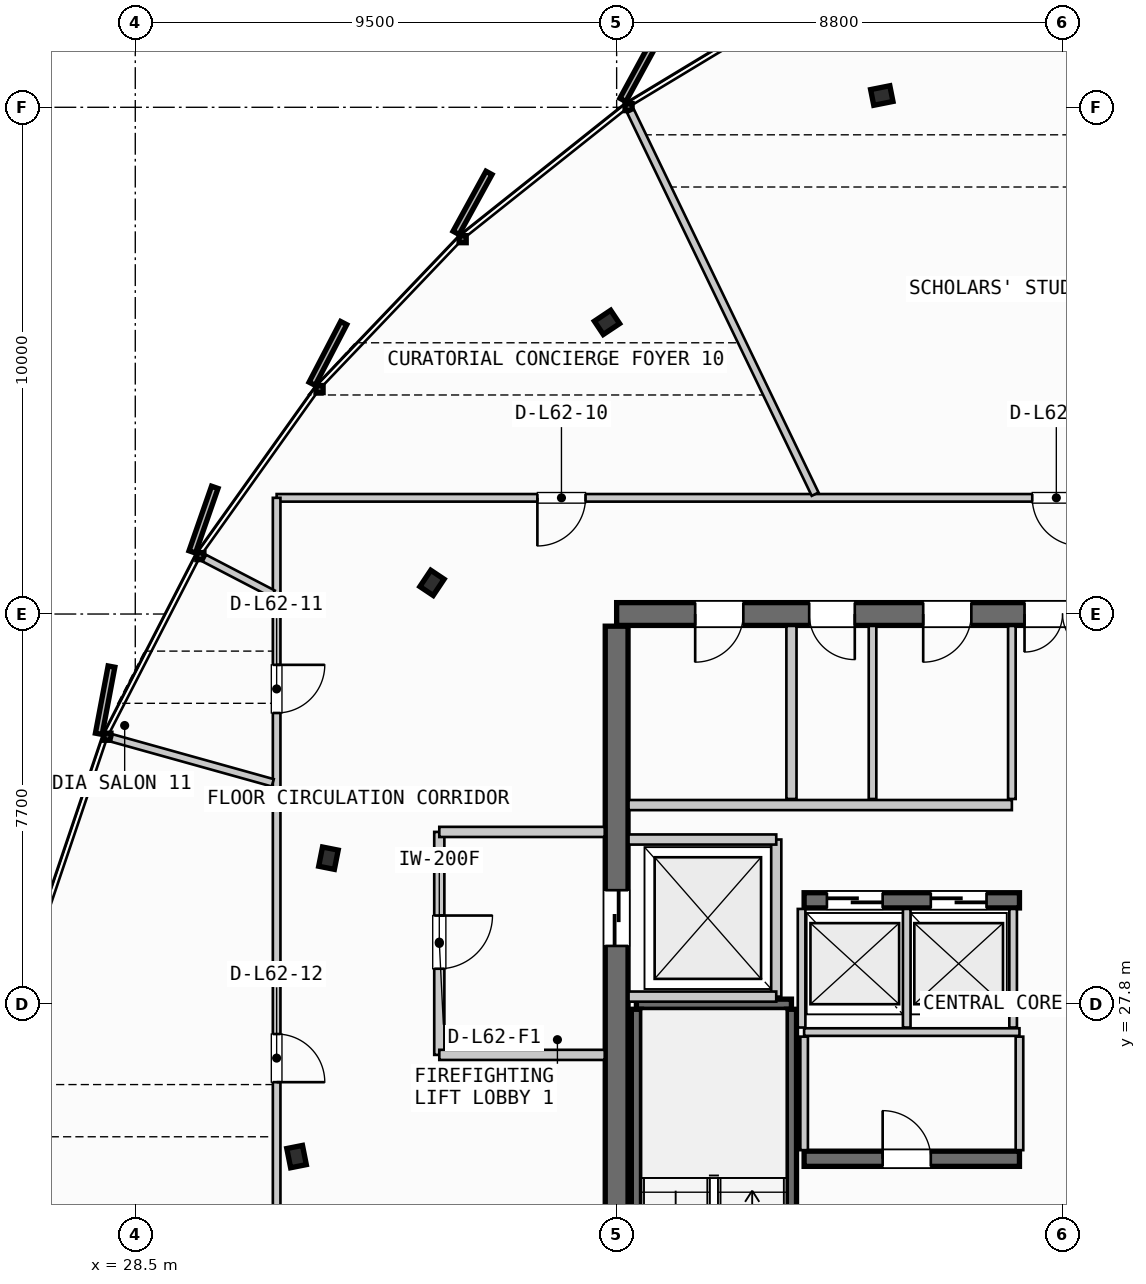
"""IFC4 building model, lengths in metres.
Left out: names, types, materials, properties, quantities, classifications, styles, units other than length and angle.
Written with IfcOpenShell. Run it as: python <this file> out.ifc"""

import sys

from ifc_helpers import new_model, si_unit, direction, frame, frame_2d, origin, origin_2d, place, context, subcontext, project, spatial, rectangle, i_section, extrude, source, transform, mapped, element, fill, save


model = new_model("IFC4")
c1 = context("Model", 3, precision=1e-05, world=origin(), true_north=direction((0.0, 1.0)))
c2 = subcontext(c1, "Body", "Model", "MODEL_VIEW")
j1 = project(units=[si_unit("LENGTHUNIT", "METRE"), si_unit("PLANEANGLEUNIT", "RADIAN")], contexts=[c1])
p1 = place(None, origin())
s1 = spatial("IfcSite", under=j1, at=p1, CompositionType="ELEMENT")
p2 = place(p1, origin())
s2 = spatial("IfcBuilding", under=s1, at=p2, CompositionType="ELEMENT")
p3 = place(p2, frame((0.0, 0.0, 238.75)))
s3 = spatial("IfcBuildingStorey", under=s2, at=p3, CompositionType="ELEMENT", Elevation=238.75)
p4 = place(p3, frame((55.6, 35.5, 0.0), z_axis=(0.0, 0.0, 1.0), x_axis=(-1.0, 0.0, 0.0)))
e1 = element("IfcWall", 1, at=p4, inside=s3, PredefinedType="SHEAR", context=c2, shape_type="SweptSolid", body=[
    extrude(rectangle(XDim=17.6, YDim=0.45, at=frame_2d((8.8, 0.0))), origin(), (0.0, 0.0, 1.0), 3.21),
])
p5 = place(p4, frame((8.05, 0.0, 0.0)))
e2 = element("IfcOpeningElement", 2, at=p5, cuts=e1, PredefinedType="OPENING", context=c2, shape_type="SweptSolid", body=[
    extrude(rectangle(XDim=1.5, YDim=2.2, at=frame_2d((0.75, 1.1))), frame((0.0, 0.235, 0.0), z_axis=(0.0, -1.0, 0.0), x_axis=(1.0, 0.0, 0.0)), (0.0, 0.0, 1.0), 0.47),
])
p6 = place(p4, frame((15.1, 0.0, 0.0)))
e3 = element("IfcOpeningElement", 3, at=p6, cuts=e1, PredefinedType="OPENING", context=c2, shape_type="SweptSolid", body=[
    extrude(rectangle(XDim=0.95, YDim=2.15, at=frame_2d((0.475, 1.075))), frame((0.0, 0.235, 0.0), z_axis=(0.0, -1.0, 0.0), x_axis=(1.0, 0.0, 0.0)), (0.0, 0.0, 1.0), 0.47),
])
p7 = place(p4, frame((12.9, 0.0, 0.0)))
e4 = element("IfcOpeningElement", 4, at=p7, cuts=e1, PredefinedType="OPENING", context=c2, shape_type="SweptSolid", body=[
    extrude(rectangle(XDim=0.9, YDim=2.15, at=frame_2d((0.45, 1.075))), frame((0.0, 0.235, 0.0), z_axis=(0.0, -1.0, 0.0), x_axis=(1.0, 0.0, 0.0)), (0.0, 0.0, 1.0), 0.47),
])
p8 = place(p4, frame((10.6, 0.0, 0.0)))
e5 = element("IfcOpeningElement", 5, at=p8, cuts=e1, PredefinedType="OPENING", context=c2, shape_type="SweptSolid", body=[
    extrude(rectangle(XDim=0.95, YDim=2.15, at=frame_2d((0.475, 1.075))), frame((0.0, 0.235, 0.0), z_axis=(0.0, -1.0, 0.0), x_axis=(1.0, 0.0, 0.0)), (0.0, 0.0, 1.0), 0.47),
])
p9 = place(p3, frame((38.0, 35.26, 0.0), z_axis=(0.0, 0.0, 1.0), x_axis=(0.0, -1.0, 0.0)))
e6 = element("IfcWall", 6, at=p9, inside=s3, PredefinedType="SHEAR", context=c2, shape_type="SweptSolid", body=[
    extrude(rectangle(XDim=14.92, YDim=0.45, at=frame_2d((7.46, 0.0))), origin(), (0.0, 0.0, 1.0), 3.21),
])
p10 = place(p9, frame((5.21, 0.0, 0.0)))
e7 = element("IfcOpeningElement", 7, at=p10, cuts=e6, PredefinedType="OPENING", context=c2, shape_type="SweptSolid", body=[
    extrude(rectangle(XDim=1.1, YDim=2.2, at=frame_2d((0.55, 1.1))), frame((0.0, 0.235, 0.0), z_axis=(0.0, -1.0, 0.0), x_axis=(1.0, 0.0, 0.0)), (0.0, 0.0, 1.0), 0.47),
])
p11 = place(p3, frame((41.7, 24.75, 0.0), z_axis=(0.0, 0.0, 1.0), x_axis=(1.0, 0.0, 0.0)))
e8 = element("IfcWall", 8, at=p11, inside=s3, PredefinedType="SHEAR", context=c2, shape_type="SweptSolid", body=[
    extrude(rectangle(XDim=4.25, YDim=0.3, at=frame_2d((2.125, 0.0))), origin(), (0.0, 0.0, 1.0), 3.21),
])
p12 = place(p11, frame((1.55, 0.0, 0.0)))
e9 = element("IfcOpeningElement", 9, at=p12, cuts=e8, PredefinedType="OPENING", context=c2, shape_type="SweptSolid", body=[
    extrude(rectangle(XDim=0.95, YDim=2.15, at=frame_2d((0.475, 1.075))), frame((0.0, 0.16, 0.0), z_axis=(0.0, -1.0, 0.0), x_axis=(1.0, 0.0, 0.0)), (0.0, 0.0, 1.0), 0.32),
])
p13 = place(p3, frame((41.7, 29.85, 0.0), z_axis=(0.0, 0.0, 1.0), x_axis=(1.0, 0.0, 0.0)))
e10 = element("IfcWall", 10, at=p13, inside=s3, PredefinedType="SHEAR", context=c2, shape_type="SweptSolid", body=[
    extrude(rectangle(XDim=4.25, YDim=0.3, at=frame_2d((2.125, 0.0))), origin(), (0.0, 0.0, 1.0), 3.21),
])
p14 = place(p13, frame((0.45, 0.0, 0.0)))
e11 = element("IfcOpeningElement", 11, at=p14, cuts=e10, PredefinedType="OPENING", context=c2, shape_type="SweptSolid", body=[
    extrude(rectangle(XDim=1.1, YDim=2.2, at=frame_2d((0.55, 1.1))), frame((0.0, 0.16, 0.0), z_axis=(0.0, -1.0, 0.0), x_axis=(1.0, 0.0, 0.0)), (0.0, 0.0, 1.0), 0.32),
])
p15 = place(p13, frame((2.5, 0.0, 0.0)))
e12 = element("IfcOpeningElement", 12, at=p15, cuts=e10, PredefinedType="OPENING", context=c2, shape_type="SweptSolid", body=[
    extrude(rectangle(XDim=1.1, YDim=2.2, at=frame_2d((0.55, 1.1))), frame((0.0, 0.16, 0.0), z_axis=(0.0, -1.0, 0.0), x_axis=(1.0, 0.0, 0.0)), (0.0, 0.0, 1.0), 0.32),
])
m1 = source(origin(), c2, "Body", "SweptSolid", [
    extrude(i_section(OverallWidth=0.387, OverallDepth=0.316, WebThickness=0.019, FlangeThickness=0.028, FilletRadius=0.015, at=origin_2d()), origin(), (0.0, 0.0, 1.0), 3.21),
])
for number, where, z_axis, x_axis in (
    (13, (43.233, 45.732, 0.0), (0.0, 0.0, 1.0), (-0.195, 0.981, 0.0)),
    (14, (37.81, 41.255, 0.0), (0.0, 0.0, 1.0), (-0.556, 0.831, 0.0)),
    (15, (34.356, 36.115, 0.0), (0.0, 0.0, 1.0), (-0.831, 0.556, 0.0)),
    (16, (32.312, 30.682, 0.0), (0.0, 0.0, 1.0), (-0.981, 0.195, 0.0)),
    (17, (31.683, 24.793, 0.0), (0.0, 0.0, 1.0), (-0.981, -0.195, 0.0)),
):
    element("IfcColumn", number, at=place(p3, frame(where, z_axis=z_axis, x_axis=x_axis)), inside=s3, PredefinedType="COLUMN", context=c2, shape_type="MappedRepresentation", body=[
        mapped(m1, transform((0.0, 0.0, 0.0), scale=1.0)),
    ])
p16 = place(p3, frame((38.39, 27.8, 0.0), z_axis=(0.0, 0.0, 1.0), x_axis=(1.0, 0.0, 0.0)))
e18 = element("IfcWall", 18, at=p16, inside=s3, PredefinedType="SHEAR", context=c2, shape_type="SweptSolid", body=[
    extrude(rectangle(XDim=3.06, YDim=0.2, at=frame_2d((1.53, 0.0))), origin(), (0.0, 0.0, 1.0), 3.21),
])
for number, where, z_axis, x_axis in (
    (19, (41.45, 27.7, 0.0), (0.0, 0.0, 1.0), (0.0, -1.0, 0.0)),
    (20, (38.39, 20.35, 0.0), (0.0, 0.0, 1.0), (0.0, 1.0, 0.0)),
):
    element("IfcWall", number, at=place(p3, frame(where, z_axis=z_axis, x_axis=x_axis)), inside=s3, PredefinedType="SHEAR", context=c2, shape_type="SweptSolid", body=[
        extrude(rectangle(XDim=7.35, YDim=0.2, at=frame_2d((3.675, 0.0))), origin(), (0.0, 0.0, 1.0), 3.21),
    ])
p17 = place(p3, frame((41.15, 27.95, 0.0), z_axis=(0.0, 0.0, 1.0), x_axis=(0.0, 1.0, 0.0)))
e21 = element("IfcWall", 21, at=p17, inside=s3, PredefinedType="PARTITIONING", context=c2, shape_type="SweptSolid", body=[
    extrude(rectangle(XDim=3.1, YDim=0.2, at=frame_2d((1.55, 0.0))), origin(), (0.0, 0.0, 1.0), 2.28),
])
for number, where, z_axis, x_axis in (
    (22, (38.235, 27.95, 0.0), (0.0, 0.0, 1.0), (1.0, 0.0, 0.0)),
    (23, (38.235, 31.05, 0.0), (0.0, 0.0, 1.0), (1.0, 0.0, 0.0)),
):
    element("IfcWall", number, at=place(p3, frame(where, z_axis=z_axis, x_axis=x_axis)), inside=s3, PredefinedType="PARTITIONING", context=c2, shape_type="SweptSolid", body=[
        extrude(rectangle(XDim=2.915, YDim=0.2, at=frame_2d((1.458, 0.0))), origin(), (0.0, 0.0, 1.0), 2.28),
    ])
p18 = place(p3, frame((34.5, 31.2, 0.0), z_axis=(0.0, 0.0, 1.0), x_axis=(0.0, -1.0, 0.0)))
e24 = element("IfcWall", 24, at=p18, inside=s3, PredefinedType="PARTITIONING", context=c2, shape_type="SweptSolid", body=[
    extrude(rectangle(XDim=4.4, YDim=0.2, at=frame_2d((2.2, 0.0))), origin(), (0.0, 0.0, 1.0), 2.28),
])
p19 = place(p18, frame((1.65, 0.0, 0.0)))
e25 = element("IfcOpeningElement", 25, at=p19, cuts=e24, PredefinedType="OPENING", context=c2, shape_type="SweptSolid", body=[
    extrude(rectangle(XDim=1.05, YDim=2.15, at=frame_2d((0.525, 1.075))), frame((0.0, 0.11, 0.0), z_axis=(0.0, -1.0, 0.0), x_axis=(1.0, 0.0, 0.0)), (0.0, 0.0, 1.0), 0.22),
])
for number, where, z_axis, x_axis in (
    (26, (34.5, 26.8, 0.0), (0.0, 0.0, 1.0), (1.0, 0.0, 0.0)),
    (27, (34.5, 31.2, 0.0), (0.0, 0.0, 1.0), (1.0, 0.0, 0.0)),
):
    element("IfcWall", number, at=place(p3, frame(where, z_axis=z_axis, x_axis=x_axis)), inside=s3, PredefinedType="PARTITIONING", context=c2, shape_type="SweptSolid", body=[
        extrude(rectangle(XDim=3.265, YDim=0.2, at=frame_2d((1.632, 0.0))), origin(), (0.0, 0.0, 1.0), 2.28),
    ])
p20 = place(p3, frame((41.7, 27.25, 0.0), z_axis=(0.0, 0.0, 1.0), x_axis=(1.0, 0.0, 0.0)))
e28 = element("IfcWall", 28, at=p20, inside=s3, PredefinedType="PARTITIONING", context=c2, shape_type="SweptSolid", body=[
    extrude(rectangle(XDim=4.25, YDim=0.15, at=frame_2d((2.125, 0.0))), origin(), (0.0, 0.0, 1.0), 2.28),
])
for number, where, z_axis, x_axis in (
    (29, (41.7, 24.92, 0.0), (0.0, 0.0, 1.0), (0.0, 1.0, 0.0)),
    (30, (45.95, 24.92, 0.0), (0.0, 0.0, 1.0), (0.0, 1.0, 0.0)),
):
    element("IfcWall", number, at=place(p3, frame(where, z_axis=z_axis, x_axis=x_axis)), inside=s3, PredefinedType="PARTITIONING", context=c2, shape_type="SweptSolid", body=[
        extrude(rectangle(XDim=2.24, YDim=0.15, at=frame_2d((1.12, 0.0))), origin(), (0.0, 0.0, 1.0), 2.28),
    ])
for number, where, z_axis, x_axis in (
    (31, (41.65, 27.34, 0.0), (0.0, 0.0, 1.0), (0.0, 1.0, 0.0)),
    (32, (43.725, 27.34, 0.0), (0.0, 0.0, 1.0), (0.0, 1.0, 0.0)),
    (33, (45.825, 27.34, 0.0), (0.0, 0.0, 1.0), (0.0, 1.0, 0.0)),
):
    element("IfcWall", number, at=place(p3, frame(where, z_axis=z_axis, x_axis=x_axis)), inside=s3, PredefinedType="PARTITIONING", context=c2, shape_type="SweptSolid", body=[
        extrude(rectangle(XDim=2.34, YDim=0.15, at=frame_2d((1.17, 0.0))), origin(), (0.0, 0.0, 1.0), 2.28),
    ])
p21 = place(p3, frame((41.45, 31.85, 0.0), z_axis=(0.0, 0.0, 1.0), x_axis=(0.0, 1.0, 0.0)))
e34 = element("IfcWall", 34, at=p21, inside=s3, PredefinedType="PARTITIONING", context=c2, shape_type="SweptSolid", body=[
    extrude(rectangle(XDim=3.415, YDim=0.2, at=frame_2d((1.708, 0.0))), origin(), (0.0, 0.0, 1.0), 2.28),
])
p22 = place(p3, frame((38.235, 31.73, 0.0), z_axis=(0.0, 0.0, 1.0), x_axis=(1.0, 0.0, 0.0)))
e35 = element("IfcWall", 35, at=p22, inside=s3, PredefinedType="PARTITIONING", context=c2, shape_type="SweptSolid", body=[
    extrude(rectangle(XDim=7.565, YDim=0.2, at=frame_2d((3.782, 0.0))), origin(), (0.0, 0.0, 1.0), 2.28),
])
p23 = place(p3, frame((45.8, 31.85, 0.0), z_axis=(0.0, 0.0, 1.0), x_axis=(0.0, 1.0, 0.0)))
e36 = element("IfcWall", 36, at=p23, inside=s3, PredefinedType="PARTITIONING", context=c2, shape_type="SweptSolid", body=[
    extrude(rectangle(XDim=3.415, YDim=0.15, at=frame_2d((1.708, 0.0))), origin(), (0.0, 0.0, 1.0), 2.28),
])
p24 = place(p3, frame((43.05, 31.85, 0.0), z_axis=(0.0, 0.0, 1.0), x_axis=(0.0, 1.0, 0.0)))
e37 = element("IfcWall", 37, at=p24, inside=s3, PredefinedType="PLUMBINGWALL", context=c2, shape_type="SweptSolid", body=[
    extrude(rectangle(XDim=3.415, YDim=0.15, at=frame_2d((1.708, 0.0))), origin(), (0.0, 0.0, 1.0), 2.28),
])
p25 = place(p3, frame((61.564, 37.793, 0.0), z_axis=(0.0, 0.0, 1.0), x_axis=(-1.0, 0.0, 0.0)))
e38 = element("IfcWall", 38, at=p25, inside=s3, PredefinedType="PARTITIONING", context=c2, shape_type="SweptSolid", body=[
    extrude(rectangle(XDim=30.274, YDim=0.15, at=frame_2d((15.137, 0.0))), origin(), (0.0, 0.0, 1.0), 2.28),
])
p26 = place(p25, frame((4.894, 0.0, 0.0)))
e39 = element("IfcOpeningElement", 39, at=p26, cuts=e38, PredefinedType="OPENING", context=c2, shape_type="SweptSolid", body=[
    extrude(rectangle(XDim=0.95, YDim=2.15, at=frame_2d((0.475, 1.075))), frame((0.0, 0.085, 0.0), z_axis=(0.0, -1.0, 0.0), x_axis=(1.0, 0.0, 0.0)), (0.0, 0.0, 1.0), 0.17),
])
p27 = place(p25, frame((14.412, 0.0, 0.0)))
e40 = element("IfcOpeningElement", 40, at=p27, cuts=e38, PredefinedType="OPENING", context=c2, shape_type="SweptSolid", body=[
    extrude(rectangle(XDim=0.95, YDim=2.15, at=frame_2d((0.475, 1.075))), frame((0.0, 0.085, 0.0), z_axis=(0.0, -1.0, 0.0), x_axis=(1.0, 0.0, 0.0)), (0.0, 0.0, 1.0), 0.17),
])
p28 = place(p25, frame((24.178, 0.0, 0.0)))
e41 = element("IfcOpeningElement", 41, at=p28, cuts=e38, PredefinedType="OPENING", context=c2, shape_type="SweptSolid", body=[
    extrude(rectangle(XDim=0.95, YDim=2.15, at=frame_2d((0.475, 1.075))), frame((0.0, 0.085, 0.0), z_axis=(0.0, -1.0, 0.0), x_axis=(1.0, 0.0, 0.0)), (0.0, 0.0, 1.0), 0.17),
])
p29 = place(p3, frame((31.29, 37.793, 0.0), z_axis=(0.0, 0.0, 1.0), x_axis=(0.0, -1.0, 0.0)))
e42 = element("IfcWall", 42, at=p29, inside=s3, PredefinedType="PARTITIONING", context=c2, shape_type="SweptSolid", body=[
    extrude(rectangle(XDim=19.986, YDim=0.15, at=frame_2d((9.993, 0.0))), origin(), (0.0, 0.0, 1.0), 2.28),
])
p30 = place(p29, frame((3.296, 0.0, 0.0)))
e43 = element("IfcOpeningElement", 43, at=p30, cuts=e42, PredefinedType="OPENING", context=c2, shape_type="SweptSolid", body=[
    extrude(rectangle(XDim=0.95, YDim=2.15, at=frame_2d((0.475, 1.075))), frame((0.0, 0.085, 0.0), z_axis=(0.0, -1.0, 0.0), x_axis=(1.0, 0.0, 0.0)), (0.0, 0.0, 1.0), 0.17),
])
p31 = place(p29, frame((10.581, 0.0, 0.0)))
e44 = element("IfcOpeningElement", 44, at=p31, cuts=e42, PredefinedType="OPENING", context=c2, shape_type="SweptSolid", body=[
    extrude(rectangle(XDim=0.95, YDim=2.15, at=frame_2d((0.475, 1.075))), frame((0.0, 0.085, 0.0), z_axis=(0.0, -1.0, 0.0), x_axis=(1.0, 0.0, 0.0)), (0.0, 0.0, 1.0), 0.17),
])
p32 = place(p3, frame((41.917, 37.865, 0.0), z_axis=(0.0, 0.0, 1.0), x_axis=(-0.434176915766, 0.900827622698, 0.0)))
e45 = element("IfcWall", 45, at=p32, inside=s3, PredefinedType="PARTITIONING", context=c2, shape_type="SweptSolid", body=[
    extrude(rectangle(XDim=8.39, YDim=0.15, at=frame_2d((4.195, 0.0))), origin(), (0.0, 0.0, 1.0), 2.28),
])
p33 = place(p3, frame((31.219, 35.897, 0.0), z_axis=(0.0, 0.0, 1.0), x_axis=(-0.887214182948, 0.461357771774, 0.0)))
e46 = element("IfcWall", 46, at=p33, inside=s3, PredefinedType="PARTITIONING", context=c2, shape_type="SweptSolid", body=[
    extrude(rectangle(XDim=1.527, YDim=0.15, at=frame_2d((0.763, 0.0))), origin(), (0.0, 0.0, 1.0), 2.28),
])
p34 = place(p3, frame((31.213, 32.169, 0.0), z_axis=(0.0, 0.0, 1.0), x_axis=(-0.963294777141, 0.268445846182, 0.0)))
e47 = element("IfcWall", 47, at=p34, inside=s3, PredefinedType="PARTITIONING", context=c2, shape_type="SweptSolid", body=[
    extrude(rectangle(XDim=3.297, YDim=0.15, at=frame_2d((1.648, 0.0))), origin(), (0.0, 0.0, 1.0), 2.28),
])
m2 = source(origin(), c2, "Body", "SweptSolid", [
    extrude(rectangle(XDim=1.5, YDim=2.2, at=frame_2d((0.75, 1.1))), frame((0.0, 0.025, 0.0), z_axis=(0.0, -1.0, 0.0), x_axis=(1.0, 0.0, 0.0)), (0.0, 0.0, 1.0), 0.05),
])
p35 = place(p5, origin())
e48 = element("IfcDoor", 48, at=p35, inside=s3, OperationType="DOUBLE_DOOR_SINGLE_SWING", PredefinedType="DOOR", context=c2, shape_type="MappedRepresentation", body=[
    mapped(m2, transform((0.0, 0.0, 0.0), scale=1.0)),
])
fill(e2, e48)
m3 = source(origin(), c2, "Body", "SweptSolid", [
    extrude(rectangle(XDim=1.1, YDim=2.2, at=frame_2d((0.55, 1.1))), frame((0.0, 0.025, 0.0), z_axis=(0.0, -1.0, 0.0), x_axis=(1.0, 0.0, 0.0)), (0.0, 0.0, 1.0), 0.05),
])
p36 = place(p10, origin())
e49 = element("IfcDoor", 49, at=p36, inside=s3, OperationType="SLIDING_TO_LEFT", PredefinedType="DOOR", context=c2, shape_type="MappedRepresentation", body=[
    mapped(m3, transform((0.0, 0.0, 0.0), scale=1.0)),
])
fill(e7, e49)
m4 = source(origin(), c2, "Body", "SweptSolid", [
    extrude(rectangle(XDim=0.95, YDim=2.15, at=frame_2d((0.475, 1.075))), frame((0.0, 0.025, 0.0), z_axis=(0.0, -1.0, 0.0), x_axis=(1.0, 0.0, 0.0)), (0.0, 0.0, 1.0), 0.05),
])
p37 = place(p12, origin())
e50 = element("IfcDoor", 50, at=p37, inside=s3, OperationType="SINGLE_SWING_LEFT", PredefinedType="DOOR", context=c2, shape_type="MappedRepresentation", body=[
    mapped(m4, transform((0.0, 0.0, 0.0), scale=1.0)),
])
fill(e9, e50)
p38 = place(p14, origin())
e51 = element("IfcDoor", 51, at=p38, inside=s3, OperationType="SLIDING_TO_LEFT", PredefinedType="DOOR", context=c2, shape_type="MappedRepresentation", body=[
    mapped(m3, transform((0.0, 0.0, 0.0), scale=1.0)),
])
fill(e11, e51)
p39 = place(p15, origin())
e52 = element("IfcDoor", 52, at=p39, inside=s3, OperationType="SLIDING_TO_LEFT", PredefinedType="DOOR", context=c2, shape_type="MappedRepresentation", body=[
    mapped(m3, transform((0.0, 0.0, 0.0), scale=1.0)),
])
fill(e12, e52)
p40 = place(p6, origin())
e53 = element("IfcDoor", 53, at=p40, inside=s3, OperationType="SINGLE_SWING_RIGHT", PredefinedType="DOOR", context=c2, shape_type="MappedRepresentation", body=[
    mapped(m4, transform((0.0, 0.0, 0.0), scale=1.0)),
])
fill(e3, e53)
m5 = source(origin(), c2, "Body", "SweptSolid", [
    extrude(rectangle(XDim=0.9, YDim=2.15, at=frame_2d((0.45, 1.075))), frame((0.0, 0.025, 0.0), z_axis=(0.0, -1.0, 0.0), x_axis=(1.0, 0.0, 0.0)), (0.0, 0.0, 1.0), 0.05),
])
p41 = place(p7, origin())
e54 = element("IfcDoor", 54, at=p41, inside=s3, OperationType="SINGLE_SWING_LEFT", PredefinedType="DOOR", context=c2, shape_type="MappedRepresentation", body=[
    mapped(m5, transform((0.0, 0.0, 0.0), scale=1.0)),
])
fill(e4, e54)
p42 = place(p8, origin())
e55 = element("IfcDoor", 55, at=p42, inside=s3, OperationType="SINGLE_SWING_RIGHT", PredefinedType="DOOR", context=c2, shape_type="MappedRepresentation", body=[
    mapped(m4, transform((0.0, 0.0, 0.0), scale=1.0)),
])
fill(e5, e55)
m6 = source(origin(), c2, "Body", "SweptSolid", [
    extrude(rectangle(XDim=1.05, YDim=2.15, at=frame_2d((0.525, 1.075))), frame((0.0, 0.025, 0.0), z_axis=(0.0, -1.0, 0.0), x_axis=(1.0, 0.0, 0.0)), (0.0, 0.0, 1.0), 0.05),
])
p43 = place(p19, origin())
e56 = element("IfcDoor", 56, at=p43, inside=s3, OperationType="SINGLE_SWING_LEFT", PredefinedType="DOOR", context=c2, shape_type="MappedRepresentation", body=[
    mapped(m6, transform((0.0, 0.0, 0.0), scale=1.0)),
])
fill(e25, e56)
p44 = place(p27, origin())
e57 = element("IfcDoor", 57, at=p44, inside=s3, OperationType="SINGLE_SWING_LEFT", PredefinedType="DOOR", context=c2, shape_type="MappedRepresentation", body=[
    mapped(m4, transform((0.0, 0.0, 0.0), scale=1.0)),
])
fill(e40, e57)
p45 = place(p28, origin())
e58 = element("IfcDoor", 58, at=p45, inside=s3, OperationType="SINGLE_SWING_RIGHT", PredefinedType="DOOR", context=c2, shape_type="MappedRepresentation", body=[
    mapped(m4, transform((0.0, 0.0, 0.0), scale=1.0)),
])
fill(e41, e58)
p46 = place(p30, origin())
e59 = element("IfcDoor", 59, at=p46, inside=s3, OperationType="SINGLE_SWING_LEFT", PredefinedType="DOOR", context=c2, shape_type="MappedRepresentation", body=[
    mapped(m4, transform((0.0, 0.0, 0.0), scale=1.0)),
])
fill(e43, e59)
p47 = place(p31, origin())
e60 = element("IfcDoor", 60, at=p47, inside=s3, OperationType="SINGLE_SWING_RIGHT", PredefinedType="DOOR", context=c2, shape_type="MappedRepresentation", body=[
    mapped(m4, transform((0.0, 0.0, 0.0), scale=1.0)),
])
fill(e44, e60)
save(model, sys.argv[1])
